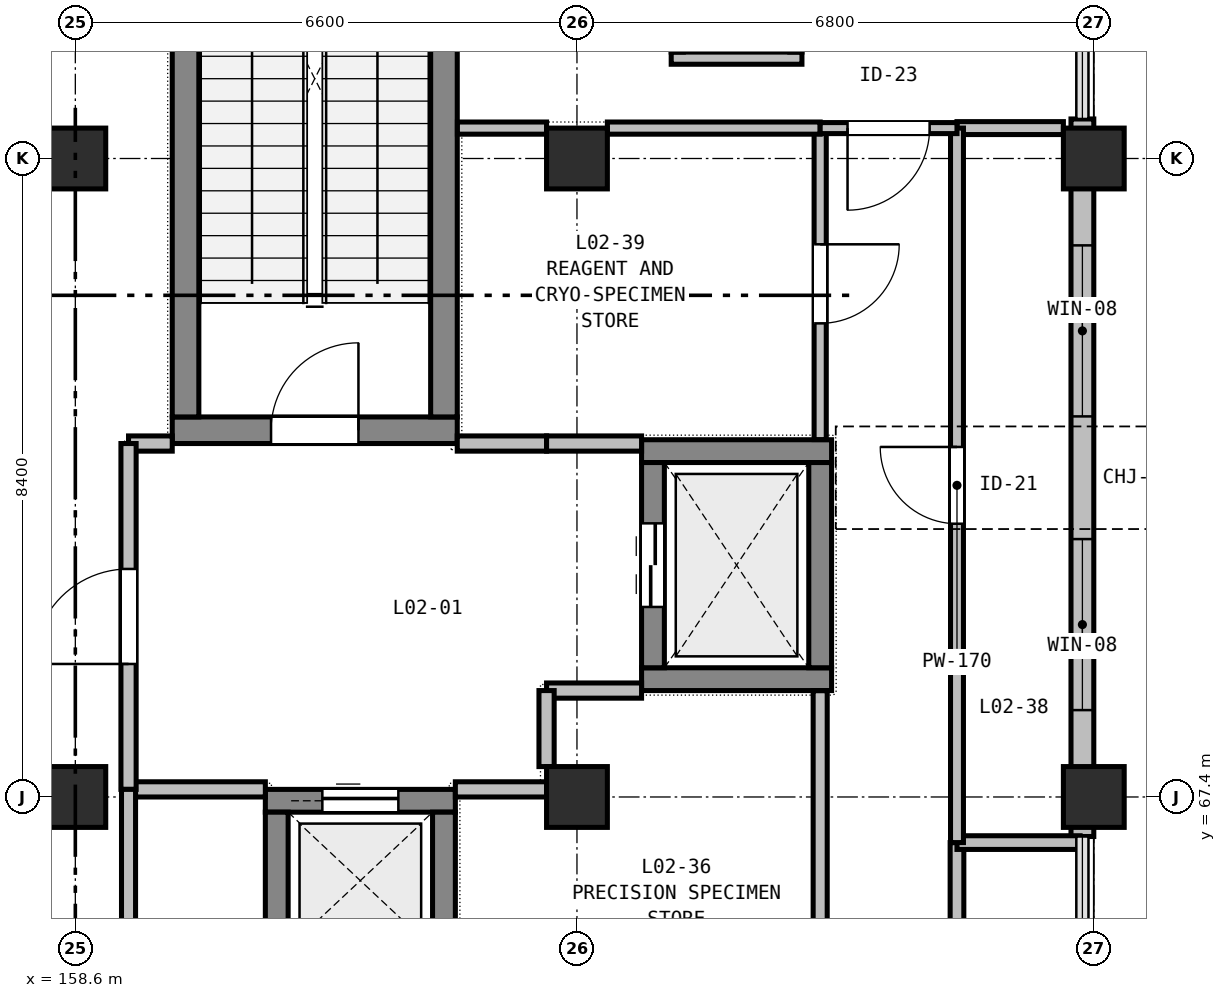
"""IFC4 building model, lengths in metres.
Left out: names, types, materials, properties, quantities, classifications, styles, units other than length and angle.
Written with IfcOpenShell. Run it as: python <this file> out.ifc"""

import sys

from ifc_helpers import new_model, si_unit, direction, frame, frame_2d, origin, origin_2d, place, context, subcontext, project, spatial, rectangle, extrude, element, fill, save


model = new_model("IFC4")
c1 = context("Model", 3, precision=1e-05, world=origin(), true_north=direction((0.0, 1.0)))
c2 = subcontext(c1, "Body", "Model", "MODEL_VIEW")
j1 = project(units=[si_unit("LENGTHUNIT", "METRE"), si_unit("PLANEANGLEUNIT", "RADIAN")], contexts=[c1])
p1 = place(None, origin())
s1 = spatial("IfcSite", under=j1, at=p1, CompositionType="ELEMENT")
p2 = place(p1, origin())
s2 = spatial("IfcBuilding", under=s1, at=p2, CompositionType="ELEMENT")
p3 = place(p2, frame((0.0, 0.0, 10.2)))
s3 = spatial("IfcBuildingStorey", under=s2, at=p3, CompositionType="ELEMENT", Elevation=10.2)
for number, where, z_axis, x_axis in (
    (1, (158.6, 67.4, 0.0), (0.0, 0.0, 1.0), (1.0, 0.0, 0.0)),
    (2, (158.6, 75.8, 0.0), (0.0, 0.0, 1.0), (1.0, 0.0, 0.0)),
    (3, (165.2, 67.4, 0.0), (0.0, 0.0, 1.0), (1.0, 0.0, 0.0)),
    (4, (165.2, 75.8, 0.0), (0.0, 0.0, 1.0), (1.0, 0.0, 0.0)),
    (5, (172.0, 67.4, 0.0), (0.0, 0.0, 1.0), (1.0, 0.0, 0.0)),
    (6, (172.0, 75.8, 0.0), (0.0, 0.0, 1.0), (1.0, 0.0, 0.0)),
):
    element("IfcColumn", number, at=place(p3, frame(where, z_axis=z_axis, x_axis=x_axis)), inside=s3, PredefinedType="COLUMN", context=c2, shape_type="SweptSolid", body=[
        extrude(rectangle(XDim=0.8, YDim=0.8, at=origin_2d()), origin(), (0.0, 0.0, 1.0), 4.8),
    ])
p4 = place(p3, frame((159.875, 72.225, 0.0), z_axis=(0.0, 0.0, 1.0), x_axis=(1.0, 0.0, 0.0)))
e7 = element("IfcWall", 7, at=p4, inside=s3, PredefinedType="SHEAR", context=c2, shape_type="SweptSolid", body=[
    extrude(rectangle(XDim=3.75, YDim=0.35, at=frame_2d((1.875, 0.0))), origin(), (0.0, 0.0, 1.0), 4.8),
])
p5 = place(p4, frame((1.3, 0.0, 0.0)))
e8 = element("IfcOpeningElement", 8, at=p5, cuts=e7, PredefinedType="OPENING", context=c2, shape_type="SweptSolid", body=[
    extrude(rectangle(XDim=1.15, YDim=2.15, at=frame_2d((0.575, 1.075))), frame((0.0, 0.185, 0.0), z_axis=(0.0, -1.0, 0.0), x_axis=(1.0, 0.0, 0.0)), (0.0, 0.0, 1.0), 0.37),
])
for number, where, z_axis, x_axis in (
    (9, (160.05, 72.4, 0.0), (0.0, 0.0, 1.0), (0.0, 1.0, 0.0)),
    (10, (163.45, 72.4, 0.0), (0.0, 0.0, 1.0), (0.0, 1.0, 0.0)),
):
    element("IfcWall", number, at=place(p3, frame(where, z_axis=z_axis, x_axis=x_axis)), inside=s3, PredefinedType="SHEAR", context=c2, shape_type="SweptSolid", body=[
        extrude(rectangle(XDim=7.375, YDim=0.35, at=frame_2d((3.688, 0.0))), origin(), (0.0, 0.0, 1.0), 4.8),
    ])
for number, where, z_axis, x_axis in (
    (11, (166.05, 68.95, 0.0), (0.0, 0.0, 1.0), (1.0, 0.0, 0.0)),
    (12, (166.05, 71.95, 0.0), (0.0, 0.0, 1.0), (1.0, 0.0, 0.0)),
):
    element("IfcWall", number, at=place(p3, frame(where, z_axis=z_axis, x_axis=x_axis)), inside=s3, PredefinedType="SHEAR", context=c2, shape_type="SweptSolid", body=[
        extrude(rectangle(XDim=2.5, YDim=0.3, at=frame_2d((1.25, 0.0))), origin(), (0.0, 0.0, 1.0), 4.8),
    ])
p6 = place(p3, frame((166.2, 69.1, 0.0), z_axis=(0.0, 0.0, 1.0), x_axis=(0.0, 1.0, 0.0)))
e13 = element("IfcWall", 13, at=p6, inside=s3, PredefinedType="SHEAR", context=c2, shape_type="SweptSolid", body=[
    extrude(rectangle(XDim=2.7, YDim=0.3, at=frame_2d((1.35, 0.0))), origin(), (0.0, 0.0, 1.0), 4.8),
])
p7 = place(p6, frame((0.8, 0.0, 0.0)))
e14 = element("IfcOpeningElement", 14, at=p7, cuts=e13, PredefinedType="OPENING", context=c2, shape_type="SweptSolid", body=[
    extrude(rectangle(XDim=1.1, YDim=2.1, at=frame_2d((0.55, 1.05))), frame((0.0, 0.16, 0.0), z_axis=(0.0, -1.0, 0.0), x_axis=(1.0, 0.0, 0.0)), (0.0, 0.0, 1.0), 0.32),
])
p8 = place(p3, frame((168.4, 69.1, 0.0), z_axis=(0.0, 0.0, 1.0), x_axis=(0.0, 1.0, 0.0)))
e15 = element("IfcWall", 15, at=p8, inside=s3, PredefinedType="SHEAR", context=c2, shape_type="SweptSolid", body=[
    extrude(rectangle(XDim=2.7, YDim=0.3, at=frame_2d((1.35, 0.0))), origin(), (0.0, 0.0, 1.0), 4.8),
])
p9 = place(p3, frame((161.1, 67.35, 0.0), z_axis=(0.0, 0.0, 1.0), x_axis=(1.0, 0.0, 0.0)))
e16 = element("IfcWall", 16, at=p9, inside=s3, PredefinedType="SHEAR", context=c2, shape_type="SweptSolid", body=[
    extrude(rectangle(XDim=2.5, YDim=0.3, at=frame_2d((1.25, 0.0))), origin(), (0.0, 0.0, 1.0), 4.8),
])
p10 = place(p9, frame((0.75, 0.0, 0.0)))
e17 = element("IfcOpeningElement", 17, at=p10, cuts=e16, PredefinedType="OPENING", context=c2, shape_type="SweptSolid", body=[
    extrude(rectangle(XDim=1.0, YDim=2.1, at=frame_2d((0.5, 1.05))), frame((0.0, 0.16, 0.0), z_axis=(0.0, -1.0, 0.0), x_axis=(1.0, 0.0, 0.0)), (0.0, 0.0, 1.0), 0.32),
])
for number, where, z_axis, x_axis in (
    (18, (161.25, 65.4, 0.0), (0.0, 0.0, 1.0), (0.0, 1.0, 0.0)),
    (19, (163.45, 65.4, 0.0), (0.0, 0.0, 1.0), (0.0, 1.0, 0.0)),
):
    element("IfcWall", number, at=place(p3, frame(where, z_axis=z_axis, x_axis=x_axis)), inside=s3, PredefinedType="SHEAR", context=c2, shape_type="SweptSolid", body=[
        extrude(rectangle(XDim=1.8, YDim=0.3, at=frame_2d((0.9, 0.0))), origin(), (0.0, 0.0, 1.0), 4.8),
    ])
p11 = place(p3, frame((171.85, 76.32, 0.0), z_axis=(0.0, 0.0, 1.0), x_axis=(0.0, -1.0, 0.0)))
e20 = element("IfcWall", 20, at=p11, inside=s3, PredefinedType="STANDARD", context=c2, shape_type="SweptSolid", body=[
    extrude(rectangle(XDim=0.52, YDim=0.3, at=frame_2d((0.26, 0.0))), origin(), (0.0, 0.0, 1.0), 4.085),
])
p12 = place(p3, frame((171.85, 75.8, 0.0), z_axis=(0.0, 0.0, 1.0), x_axis=(0.0, -1.0, 0.0)))
e21 = element("IfcWall", 21, at=p12, inside=s3, PredefinedType="STANDARD", context=c2, shape_type="SweptSolid", body=[
    extrude(rectangle(XDim=8.4, YDim=0.3, at=frame_2d((4.2, 0.0))), origin(), (0.0, 0.0, 1.0), 4.085),
])
p13 = place(p12, frame((1.143, 0.0, 0.9)))
e22 = element("IfcOpeningElement", 22, at=p13, cuts=e21, PredefinedType="OPENING", context=c2, shape_type="SweptSolid", body=[
    extrude(rectangle(XDim=2.25, YDim=2.1, at=frame_2d((1.125, 1.05))), frame((0.0, 0.16, 0.0), z_axis=(0.0, -1.0, 0.0), x_axis=(1.0, 0.0, 0.0)), (0.0, 0.0, 1.0), 0.32),
])
p14 = place(p12, frame((5.007, 0.0, 0.9)))
e23 = element("IfcOpeningElement", 23, at=p14, cuts=e21, PredefinedType="OPENING", context=c2, shape_type="SweptSolid", body=[
    extrude(rectangle(XDim=2.25, YDim=2.1, at=frame_2d((1.125, 1.05))), frame((0.0, 0.16, 0.0), z_axis=(0.0, -1.0, 0.0), x_axis=(1.0, 0.0, 0.0)), (0.0, 0.0, 1.0), 0.32),
])
p15 = place(p3, frame((171.85, 67.4, 0.0), z_axis=(0.0, 0.0, 1.0), x_axis=(0.0, -1.0, 0.0)))
e24 = element("IfcWall", 24, at=p15, inside=s3, PredefinedType="STANDARD", context=c2, shape_type="SweptSolid", body=[
    extrude(rectangle(XDim=0.52, YDim=0.3, at=frame_2d((0.26, 0.0))), origin(), (0.0, 0.0, 1.0), 4.085),
])
p16 = place(p3, frame((166.44, 77.12, 0.0), z_axis=(0.0, 0.0, 1.0), x_axis=(1.0, 0.0, 0.0)))
e25 = element("IfcWall", 25, at=p16, inside=s3, PredefinedType="PARTITIONING", context=c2, shape_type="SweptSolid", body=[
    extrude(rectangle(XDim=1.72, YDim=0.16, at=frame_2d((0.86, 0.0))), origin(), (0.0, 0.0, 1.0), 4.495),
])
p17 = place(p3, frame((159.3, 72.05, 0.0), z_axis=(0.0, 0.0, 1.0), x_axis=(1.0, 0.0, 0.0)))
e26 = element("IfcWall", 26, at=p17, inside=s3, PredefinedType="PARTITIONING", context=c2, shape_type="SweptSolid", body=[
    extrude(rectangle(XDim=0.575, YDim=0.2, at=frame_2d((0.288, 0.0))), origin(), (0.0, 0.0, 1.0), 4.495),
])
p18 = place(p3, frame((163.625, 72.05, 0.0), z_axis=(0.0, 0.0, 1.0), x_axis=(1.0, 0.0, 0.0)))
e27 = element("IfcWall", 27, at=p18, inside=s3, PredefinedType="PARTITIONING", context=c2, shape_type="SweptSolid", body=[
    extrude(rectangle(XDim=1.175, YDim=0.2, at=frame_2d((0.587, 0.0))), origin(), (0.0, 0.0, 1.0), 4.495),
])
for number, where, z_axis, x_axis in (
    (28, (164.8, 72.05, 0.0), (0.0, 0.0, 1.0), (1.0, 0.0, 0.0)),
    (29, (166.05, 68.8, 0.0), (0.0, 0.0, 1.0), (-1.0, 0.0, 0.0)),
):
    element("IfcWall", number, at=place(p3, frame(where, z_axis=z_axis, x_axis=x_axis)), inside=s3, PredefinedType="PARTITIONING", context=c2, shape_type="SweptSolid", body=[
        extrude(rectangle(XDim=1.25, YDim=0.2, at=frame_2d((0.625, 0.0))), origin(), (0.0, 0.0, 1.0), 3.935),
    ])
p19 = place(p3, frame((164.8, 68.8, 0.0), z_axis=(0.0, 0.0, 1.0), x_axis=(0.0, -1.0, 0.0)))
e30 = element("IfcWall", 30, at=p19, inside=s3, PredefinedType="PARTITIONING", context=c2, shape_type="SweptSolid", body=[
    extrude(rectangle(XDim=1.0, YDim=0.2, at=frame_2d((0.5, 0.0))), origin(), (0.0, 0.0, 1.0), 4.495),
])
p20 = place(p3, frame((164.8, 67.5, 0.0), z_axis=(0.0, 0.0, 1.0), x_axis=(-1.0, 0.0, 0.0)))
e31 = element("IfcWall", 31, at=p20, inside=s3, PredefinedType="PARTITIONING", context=c2, shape_type="SweptSolid", body=[
    extrude(rectangle(XDim=1.2, YDim=0.2, at=frame_2d((0.6, 0.0))), origin(), (0.0, 0.0, 1.0), 4.135),
])
p21 = place(p3, frame((161.1, 67.5, 0.0), z_axis=(0.0, 0.0, 1.0), x_axis=(-1.0, 0.0, 0.0)))
e32 = element("IfcWall", 32, at=p21, inside=s3, PredefinedType="PARTITIONING", context=c2, shape_type="SweptSolid", body=[
    extrude(rectangle(XDim=1.8, YDim=0.2, at=frame_2d((0.9, 0.0))), origin(), (0.0, 0.0, 1.0), 4.135),
])
p22 = place(p3, frame((159.3, 67.5, 0.0), z_axis=(0.0, 0.0, 1.0), x_axis=(0.0, 1.0, 0.0)))
e33 = element("IfcWall", 33, at=p22, inside=s3, PredefinedType="PARTITIONING", context=c2, shape_type="SweptSolid", body=[
    extrude(rectangle(XDim=4.55, YDim=0.2, at=frame_2d((2.275, 0.0))), origin(), (0.0, 0.0, 1.0), 4.135),
])
p23 = place(p22, frame((1.65, 0.0, 0.0)))
e34 = element("IfcOpeningElement", 34, at=p23, cuts=e33, PredefinedType="OPENING", context=c2, shape_type="SweptSolid", body=[
    extrude(rectangle(XDim=1.25, YDim=2.15, at=frame_2d((0.625, 1.075))), frame((0.0, 0.11, 0.0), z_axis=(0.0, -1.0, 0.0), x_axis=(1.0, 0.0, 0.0)), (0.0, 0.0, 1.0), 0.22),
])
p24 = place(p3, frame((168.4, 68.798, 0.0), z_axis=(0.0, 0.0, 1.0), x_axis=(0.0, -1.0, 0.0)))
e35 = element("IfcWall", 35, at=p24, inside=s3, PredefinedType="PARTITIONING", context=c2, shape_type="SweptSolid", body=[
    extrude(rectangle(XDim=6.198, YDim=0.185, at=frame_2d((3.099, 0.0))), origin(), (0.0, 0.0, 1.0), 4.135),
])
p25 = place(p3, frame((159.3, 65.05, 0.0), z_axis=(0.0, 0.0, 1.0), x_axis=(0.0, 1.0, 0.0)))
e36 = element("IfcWall", 36, at=p25, inside=s3, PredefinedType="PARTITIONING", context=c2, shape_type="SweptSolid", body=[
    extrude(rectangle(XDim=2.45, YDim=0.185, at=frame_2d((1.225, 0.0))), origin(), (0.0, 0.0, 1.0), 4.135),
])
p26 = place(p3, frame((170.2, 59.302, 0.0), z_axis=(0.0, 0.0, 1.0), x_axis=(0.0, 1.0, 0.0)))
e37 = element("IfcWall", 37, at=p26, inside=s3, PredefinedType="PARTITIONING", context=c2, shape_type="SweptSolid", body=[
    extrude(rectangle(XDim=7.498, YDim=0.18, at=frame_2d((3.749, 0.0))), origin(), (0.0, 0.0, 1.0), 4.085),
])
p27 = place(p26, frame((3.269, 0.0, 0.0)))
e38 = element("IfcOpeningElement", 38, at=p27, cuts=e37, PredefinedType="OPENING", context=c2, shape_type="SweptSolid", body=[
    extrude(rectangle(XDim=0.96, YDim=2.14, at=frame_2d((0.48, 1.07))), frame((0.0, 0.1, 0.0), z_axis=(0.0, -1.0, 0.0), x_axis=(1.0, 0.0, 0.0)), (0.0, 0.0, 1.0), 0.2),
])
p28 = place(p3, frame((170.2, 66.8, 0.0), z_axis=(0.0, 0.0, 1.0), x_axis=(1.0, 0.0, 0.0)))
e39 = element("IfcWall", 39, at=p28, inside=s3, PredefinedType="PARTITIONING", context=c2, shape_type="SweptSolid", body=[
    extrude(rectangle(XDim=1.62, YDim=0.18, at=frame_2d((0.81, 0.0))), origin(), (0.0, 0.0, 1.0), 4.085),
])
p29 = place(p3, frame((170.2, 76.2, 0.0), z_axis=(0.0, 0.0, 1.0), x_axis=(1.0, 0.0, 0.0)))
e40 = element("IfcWall", 40, at=p29, inside=s3, PredefinedType="PARTITIONING", context=c2, shape_type="SweptSolid", body=[
    extrude(rectangle(XDim=1.4, YDim=0.17, at=frame_2d((0.7, 0.0))), origin(), (0.0, 0.0, 1.0), 4.495),
])
p30 = place(p3, frame((170.2, 66.8, 0.0), z_axis=(0.0, 0.0, 1.0), x_axis=(0.0, 1.0, 0.0)))
e41 = element("IfcWall", 41, at=p30, inside=s3, PredefinedType="PARTITIONING", context=c2, shape_type="SweptSolid", body=[
    extrude(rectangle(XDim=9.4, YDim=0.17, at=frame_2d((4.7, 0.0))), origin(), (0.0, 0.0, 1.0), 4.135),
])
p31 = place(p30, frame((4.195, 0.0, 0.0)))
e42 = element("IfcOpeningElement", 42, at=p31, cuts=e41, PredefinedType="OPENING", context=c2, shape_type="SweptSolid", body=[
    extrude(rectangle(XDim=1.01, YDim=2.14, at=frame_2d((0.505, 1.07))), frame((0.0, 0.095, 0.0), z_axis=(0.0, -1.0, 0.0), x_axis=(1.0, 0.0, 0.0)), (0.0, 0.0, 1.0), 0.19),
])
p32 = place(p3, frame((168.4, 76.2, 0.0), z_axis=(0.0, 0.0, 1.0), x_axis=(0.0, -1.0, 0.0)))
e43 = element("IfcWall", 43, at=p32, inside=s3, PredefinedType="PARTITIONING", context=c2, shape_type="SweptSolid", body=[
    extrude(rectangle(XDim=4.098, YDim=0.16, at=frame_2d((2.049, 0.0))), origin(), (0.0, 0.0, 1.0), 4.135),
])
p33 = place(p32, frame((1.529, 0.0, 0.0)))
e44 = element("IfcOpeningElement", 44, at=p33, cuts=e43, PredefinedType="OPENING", context=c2, shape_type="SweptSolid", body=[
    extrude(rectangle(XDim=1.04, YDim=2.14, at=frame_2d((0.52, 1.07))), frame((0.0, 0.09, 0.0), z_axis=(0.0, -1.0, 0.0), x_axis=(1.0, 0.0, 0.0)), (0.0, 0.0, 1.0), 0.18),
])
p34 = place(p3, frame((163.627, 76.2, 0.0), z_axis=(0.0, 0.0, 1.0), x_axis=(1.0, 0.0, 0.0)))
e45 = element("IfcWall", 45, at=p34, inside=s3, PredefinedType="PARTITIONING", context=c2, shape_type="SweptSolid", body=[
    extrude(rectangle(XDim=1.173, YDim=0.16, at=frame_2d((0.586, 0.0))), origin(), (0.0, 0.0, 1.0), 4.495),
])
p35 = place(p3, frame((165.6, 76.2, 0.0), z_axis=(0.0, 0.0, 1.0), x_axis=(1.0, 0.0, 0.0)))
e46 = element("IfcWall", 46, at=p35, inside=s3, PredefinedType="PARTITIONING", context=c2, shape_type="SweptSolid", body=[
    extrude(rectangle(XDim=2.8, YDim=0.16, at=frame_2d((1.4, 0.0))), origin(), (0.0, 0.0, 1.0), 4.285),
])
p36 = place(p3, frame((170.2, 76.2, 0.0), z_axis=(0.0, 0.0, 1.0), x_axis=(-1.0, 0.0, 0.0)))
e47 = element("IfcWall", 47, at=p36, inside=s3, PredefinedType="PARTITIONING", context=c2, shape_type="SweptSolid", body=[
    extrude(rectangle(XDim=1.8, YDim=0.145, at=frame_2d((0.9, 0.0))), origin(), (0.0, 0.0, 1.0), 4.285),
])
p37 = place(p36, frame((0.36, 0.0, 0.0)))
e48 = element("IfcOpeningElement", 48, at=p37, cuts=e47, PredefinedType="OPENING", context=c2, shape_type="SweptSolid", body=[
    extrude(rectangle(XDim=1.08, YDim=2.14, at=frame_2d((0.54, 1.07))), frame((0.0, 0.083, 0.0), z_axis=(0.0, -1.0, 0.0), x_axis=(1.0, 0.0, 0.0)), (0.0, 0.0, 1.0), 0.165),
])
p38 = place(p13, origin())
e49 = element("IfcWindow", 49, at=p38, inside=s3, PartitioningType="SINGLE_PANEL", PredefinedType="WINDOW", context=c2, shape_type="SweptSolid", body=[
    extrude(rectangle(XDim=2.25, YDim=2.1, at=frame_2d((1.125, 1.05))), frame((0.0, 0.03, 0.0), z_axis=(0.0, -1.0, 0.0), x_axis=(1.0, 0.0, 0.0)), (0.0, 0.0, 1.0), 0.06),
])
fill(e22, e49)
p39 = place(p14, origin())
e50 = element("IfcWindow", 50, at=p39, inside=s3, PartitioningType="SINGLE_PANEL", PredefinedType="WINDOW", context=c2, shape_type="SweptSolid", body=[
    extrude(rectangle(XDim=2.25, YDim=2.1, at=frame_2d((1.125, 1.05))), frame((0.0, 0.03, 0.0), z_axis=(0.0, -1.0, 0.0), x_axis=(1.0, 0.0, 0.0)), (0.0, 0.0, 1.0), 0.06),
])
fill(e23, e50)
p40 = place(p5, origin())
e51 = element("IfcDoor", 51, at=p40, inside=s3, OperationType="SINGLE_SWING_RIGHT", PredefinedType="DOOR", context=c2, shape_type="SweptSolid", body=[
    extrude(rectangle(XDim=1.15, YDim=2.15, at=frame_2d((0.575, 1.075))), frame((0.0, 0.025, 0.0), z_axis=(0.0, -1.0, 0.0), x_axis=(1.0, 0.0, 0.0)), (0.0, 0.0, 1.0), 0.05),
])
fill(e8, e51)
p41 = place(p7, origin())
e52 = element("IfcDoor", 52, at=p41, inside=s3, OperationType="DOUBLE_DOOR_SLIDING", PredefinedType="DOOR", context=c2, shape_type="SweptSolid", body=[
    extrude(rectangle(XDim=1.1, YDim=2.1, at=frame_2d((0.55, 1.05))), frame((0.0, 0.025, 0.0), z_axis=(0.0, -1.0, 0.0), x_axis=(1.0, 0.0, 0.0)), (0.0, 0.0, 1.0), 0.05),
])
fill(e14, e52)
p42 = place(p10, origin())
e53 = element("IfcDoor", 53, at=p42, inside=s3, OperationType="SLIDING_TO_LEFT", PredefinedType="DOOR", context=c2, shape_type="SweptSolid", body=[
    extrude(rectangle(XDim=1.0, YDim=2.1, at=frame_2d((0.5, 1.05))), frame((0.0, 0.025, 0.0), z_axis=(0.0, -1.0, 0.0), x_axis=(1.0, 0.0, 0.0)), (0.0, 0.0, 1.0), 0.05),
])
fill(e17, e53)
p43 = place(p23, origin())
e54 = element("IfcDoor", 54, at=p43, inside=s3, OperationType="SINGLE_SWING_LEFT", PredefinedType="DOOR", context=c2, shape_type="SweptSolid", body=[
    extrude(rectangle(XDim=1.25, YDim=2.15, at=frame_2d((0.625, 1.075))), frame((0.0, 0.025, 0.0), z_axis=(0.0, -1.0, 0.0), x_axis=(1.0, 0.0, 0.0)), (0.0, 0.0, 1.0), 0.05),
])
fill(e34, e54)
p44 = place(p31, origin())
e55 = element("IfcDoor", 55, at=p44, inside=s3, OperationType="SINGLE_SWING_RIGHT", PredefinedType="DOOR", context=c2, shape_type="SweptSolid", body=[
    extrude(rectangle(XDim=1.01, YDim=2.14, at=frame_2d((0.505, 1.07))), frame((0.0, 0.025, 0.0), z_axis=(0.0, -1.0, 0.0), x_axis=(1.0, 0.0, 0.0)), (0.0, 0.0, 1.0), 0.05),
])
fill(e42, e55)
p45 = place(p33, origin())
e56 = element("IfcDoor", 56, at=p45, inside=s3, OperationType="SINGLE_SWING_LEFT", PredefinedType="DOOR", context=c2, shape_type="SweptSolid", body=[
    extrude(rectangle(XDim=1.04, YDim=2.14, at=frame_2d((0.52, 1.07))), frame((0.0, 0.025, 0.0), z_axis=(0.0, -1.0, 0.0), x_axis=(1.0, 0.0, 0.0)), (0.0, 0.0, 1.0), 0.05),
])
fill(e44, e56)
p46 = place(p37, origin())
e57 = element("IfcDoor", 57, at=p46, inside=s3, OperationType="SINGLE_SWING_RIGHT", PredefinedType="DOOR", context=c2, shape_type="SweptSolid", body=[
    extrude(rectangle(XDim=1.08, YDim=2.14, at=frame_2d((0.54, 1.07))), frame((0.0, 0.025, 0.0), z_axis=(0.0, -1.0, 0.0), x_axis=(1.0, 0.0, 0.0)), (0.0, 0.0, 1.0), 0.05),
])
fill(e48, e57)
save(model, sys.argv[1])
